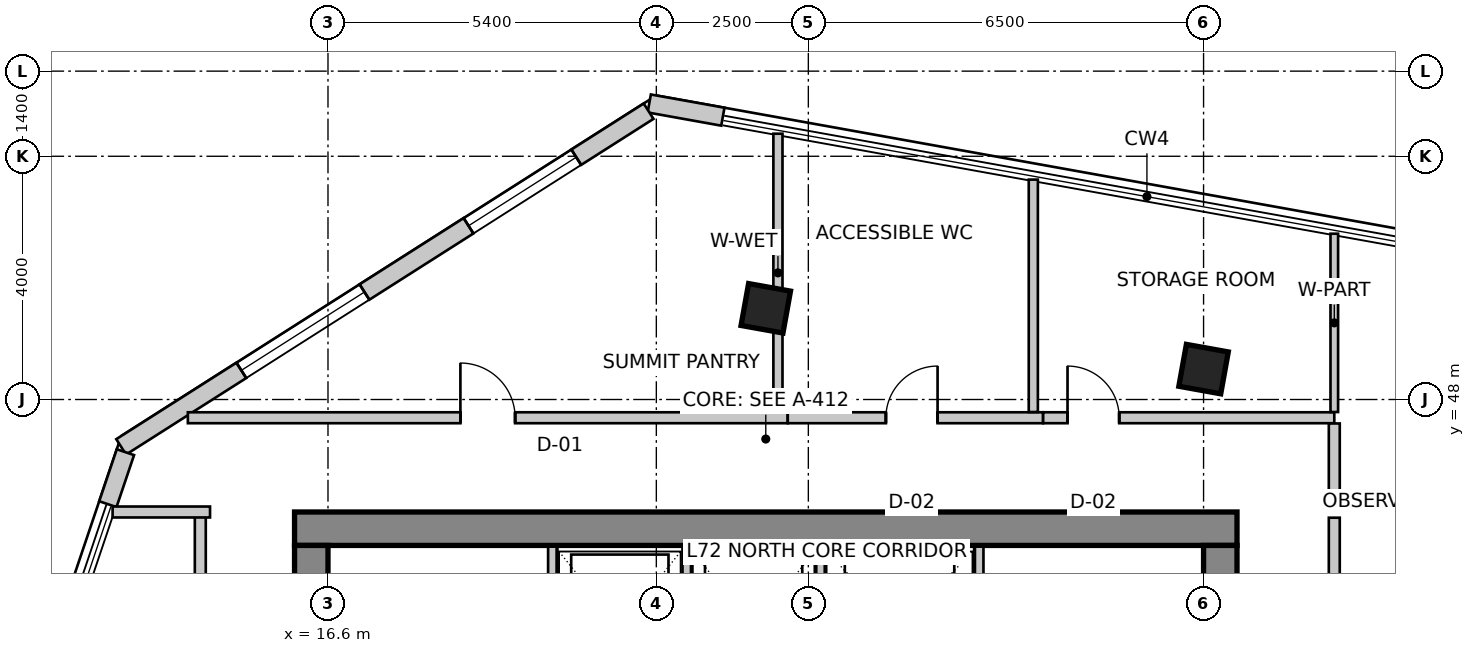
"""IFC4 building model, lengths in metres.
Left out: names, types, materials, properties, quantities, classifications, styles, units other than length and angle.
Written with IfcOpenShell. Run it as: python <this file> out.ifc"""

import sys

from ifc_helpers import new_model, si_unit, direction, frame, frame_2d, origin, origin_2d, place, context, subcontext, project, spatial, rectangle, extrude, source, transform, mapped, element, fill, save


model = new_model("IFC4")
c1 = context("Model", 3, precision=1e-05, world=origin(), true_north=direction((0.0, 1.0)))
c2 = subcontext(c1, "Body", "Model", "MODEL_VIEW")
j1 = project(units=[si_unit("LENGTHUNIT", "METRE"), si_unit("PLANEANGLEUNIT", "RADIAN")], contexts=[c1])
p1 = place(None, origin())
s1 = spatial("IfcSite", under=j1, at=p1, CompositionType="ELEMENT")
p2 = place(p1, origin())
s2 = spatial("IfcBuilding", under=s1, at=p2, CompositionType="ELEMENT")
p3 = place(p2, frame((0.0, 0.0, 281.7)))
s3 = spatial("IfcBuildingStorey", under=s2, at=p3, CompositionType="ELEMENT", Elevation=281.7)
p4 = place(p3, frame((16.05, 45.875, 0.0), z_axis=(0.0, 0.0, 1.0), x_axis=(1.0, 0.0, 0.0)))
e1 = element("IfcWall", 1, at=p4, inside=s3, PredefinedType="SHEAR", context=c2, shape_type="SweptSolid", body=[
    extrude(rectangle(XDim=15.5, YDim=0.55, at=frame_2d((7.75, 0.0))), origin(), (0.0, 0.0, 1.0), 3.6),
])
p5 = place(p3, frame((16.325, 34.2, 0.0), z_axis=(0.0, 0.0, 1.0), x_axis=(0.0, 1.0, 0.0)))
e2 = element("IfcWall", 2, at=p5, inside=s3, PredefinedType="SHEAR", context=c2, shape_type="SweptSolid", body=[
    extrude(rectangle(XDim=11.4, YDim=0.55, at=frame_2d((5.7, 0.0))), origin(), (0.0, 0.0, 1.0), 3.6),
])
m1 = source(origin(), c2, "Body", "SweptSolid", [
    extrude(rectangle(XDim=1.1, YDim=2.15, at=frame_2d((0.55, 1.075))), frame((0.0, 0.285, 0.0), z_axis=(0.0, -1.0, 0.0), x_axis=(1.0, 0.0, 0.0)), (0.0, 0.0, 1.0), 0.57),
])
p6 = place(p5, frame((7.15, 0.0, 0.0)))
e3 = element("IfcOpeningElement", 3, at=p6, cuts=e2, PredefinedType="OPENING", context=c2, shape_type="MappedRepresentation", body=[
    mapped(m1, transform((0.0, 0.0, 0.0), scale=1.0)),
])
p7 = place(p3, frame((31.275, 34.2, 0.0), z_axis=(0.0, 0.0, 1.0), x_axis=(0.0, 1.0, 0.0)))
e4 = element("IfcWall", 4, at=p7, inside=s3, PredefinedType="SHEAR", context=c2, shape_type="SweptSolid", body=[
    extrude(rectangle(XDim=11.4, YDim=0.55, at=frame_2d((5.7, 0.0))), origin(), (0.0, 0.0, 1.0), 3.6),
])
p8 = place(p7, frame((7.35, 0.0, 0.0)))
e5 = element("IfcOpeningElement", 5, at=p8, cuts=e4, PredefinedType="OPENING", context=c2, shape_type="MappedRepresentation", body=[
    mapped(m1, transform((0.0, 0.0, 0.0), scale=1.0)),
])
m2 = source(origin(), c2, "Body", "SweptSolid", [
    extrude(rectangle(XDim=0.7, YDim=0.7, at=origin_2d()), origin(), (0.0, 0.0, 1.0), 3.6),
])
for number, where, z_axis, x_axis in (
    (6, (23.8, 49.5, 0.0), (0.0, 0.0, 1.0), (0.984, -0.177, 0.0)),
    (7, (31.0, 48.5, 0.0), (0.0, 0.0, 1.0), (0.984, -0.177, 0.0)),
):
    element("IfcColumn", number, at=place(p3, frame(where, z_axis=z_axis, x_axis=x_axis)), inside=s3, PredefinedType="COLUMN", context=c2, shape_type="MappedRepresentation", body=[
        mapped(m2, transform((0.0, 0.0, 0.0), scale=1.0)),
    ])
p9 = place(p3, frame((23.094, 52.651, 0.0), z_axis=(0.0, 0.0, 1.0), x_axis=(-0.984233125072, 0.176876102146, 0.0)))
e8 = element("IfcWall", 8, at=p9, inside=s3, PredefinedType="SOLIDWALL", context=c2, shape_type="SweptSolid", body=[
    extrude(rectangle(XDim=1.23, YDim=0.3, at=frame_2d((0.615, 0.0))), origin(), (0.0, 0.0, 1.0), 3.35),
])
p10 = place(p3, frame((21.873, 52.741, 0.0), z_axis=(0.0, 0.0, 1.0), x_axis=(-0.843661487732, -0.536875492193, 0.0)))
e9 = element("IfcWall", 9, at=p10, inside=s3, PredefinedType="SOLIDWALL", context=c2, shape_type="SweptSolid", body=[
    extrude(rectangle(XDim=10.282, YDim=0.3, at=frame_2d((5.141, 0.0))), origin(), (0.0, 0.0, 1.0), 3.35),
])
m3 = source(origin(), c2, "Body", "SweptSolid", [
    extrude(rectangle(XDim=2.1, YDim=2.0, at=frame_2d((1.05, 1.0))), frame((0.0, 0.16, 0.0), z_axis=(0.0, -1.0, 0.0), x_axis=(1.0, 0.0, 0.0)), (0.0, 0.0, 1.0), 0.32),
])
p11 = place(p10, frame((1.41, 0.0, 0.85)))
e10 = element("IfcOpeningElement", 10, at=p11, cuts=e9, PredefinedType="OPENING", context=c2, shape_type="MappedRepresentation", body=[
    mapped(m3, transform((0.0, 0.0, 0.0), scale=1.0)),
])
m4 = source(origin(), c2, "Body", "SweptSolid", [
    extrude(rectangle(XDim=2.4, YDim=2.2, at=frame_2d((1.2, 1.1))), frame((0.0, 0.16, 0.0), z_axis=(0.0, -1.0, 0.0), x_axis=(1.0, 0.0, 0.0)), (0.0, 0.0, 1.0), 0.32),
])
p12 = place(p10, frame((5.539, 0.0, 0.85)))
e11 = element("IfcOpeningElement", 11, at=p12, cuts=e9, PredefinedType="OPENING", context=c2, shape_type="MappedRepresentation", body=[
    mapped(m4, transform((0.0, 0.0, 0.0), scale=1.0)),
])
p13 = place(p3, frame((13.269, 47.134, 0.0), z_axis=(0.0, 0.0, 1.0), x_axis=(-0.31995770778, -0.947431826166, 0.0)))
e12 = element("IfcWall", 12, at=p13, inside=s3, PredefinedType="SOLIDWALL", context=c2, shape_type="SweptSolid", body=[
    extrude(rectangle(XDim=0.903, YDim=0.3, at=frame_2d((0.451, 0.0))), origin(), (0.0, 0.0, 1.0), 3.35),
])
for number, where, z_axis, x_axis in (
    (13, (20.29, 43.28, 0.0), (0.0, 0.0, 1.0), (0.0, 1.0, 0.0)),
    (14, (27.31, 43.28, 0.0), (0.0, 0.0, 1.0), (0.0, 1.0, 0.0)),
):
    element("IfcWall", number, at=place(p3, frame(where, z_axis=z_axis, x_axis=x_axis)), inside=s3, PredefinedType="SOLIDWALL", context=c2, shape_type="SweptSolid", body=[
        extrude(rectangle(XDim=2.3, YDim=0.14, at=frame_2d((1.15, 0.0))), origin(), (0.0, 0.0, 1.0), 3.35),
    ])
for number, where, z_axis, x_axis in (
    (15, (22.5, 43.02, 0.0), (0.0, 0.0, 1.0), (0.0, 1.0, 0.0)),
    (16, (24.7, 43.02, 0.0), (0.0, 0.0, 1.0), (0.0, 1.0, 0.0)),
):
    element("IfcWall", number, at=place(p3, frame(where, z_axis=z_axis, x_axis=x_axis)), inside=s3, PredefinedType="SOLIDWALL", context=c2, shape_type="SweptSolid", body=[
        extrude(rectangle(XDim=2.56, YDim=0.14, at=frame_2d((1.28, 0.0))), origin(), (0.0, 0.0, 1.0), 3.35),
    ])
p14 = place(p3, frame((14.5, 33.744, 0.0), z_axis=(0.0, 0.0, 1.0), x_axis=(0.0, 1.0, 0.0)))
e17 = element("IfcWall", 17, at=p14, inside=s3, PredefinedType="PARTITIONING", context=c2, shape_type="SweptSolid", body=[
    extrude(rectangle(XDim=12.406, YDim=0.18, at=frame_2d((6.203, 0.0))), origin(), (0.0, 0.0, 1.0), 3.35),
])
m5 = source(origin(), c2, "Body", "SweptSolid", [
    extrude(rectangle(XDim=0.9, YDim=2.15, at=frame_2d((0.45, 1.075))), frame((0.0, 0.1, 0.0), z_axis=(0.0, -1.0, 0.0), x_axis=(1.0, 0.0, 0.0)), (0.0, 0.0, 1.0), 0.2),
])
p15 = place(p14, frame((4.37, 0.0, 0.0)))
e18 = element("IfcOpeningElement", 18, at=p15, cuts=e17, PredefinedType="OPENING", context=c2, shape_type="MappedRepresentation", body=[
    mapped(m5, transform((0.0, 0.0, 0.0), scale=1.0)),
])
p16 = place(p3, frame((14.66, 46.15, 0.0), z_axis=(0.0, 0.0, 1.0), x_axis=(-1.0, 0.0, 0.0)))
e19 = element("IfcWall", 19, at=p16, inside=s3, PredefinedType="PARTITIONING", context=c2, shape_type="SweptSolid", body=[
    extrude(rectangle(XDim=1.602, YDim=0.18, at=frame_2d((0.801, 0.0))), origin(), (0.0, 0.0, 1.0), 3.35),
])
p17 = place(p3, frame((14.295, 47.7, 0.0), z_axis=(0.0, 0.0, 1.0), x_axis=(1.0, 0.0, 0.0)))
e20 = element("IfcWall", 20, at=p17, inside=s3, PredefinedType="PARTITIONING", context=c2, shape_type="SweptSolid", body=[
    extrude(rectangle(XDim=9.865, YDim=0.18, at=frame_2d((4.932, 0.0))), origin(), (0.0, 0.0, 1.0), 2.935),
])
p18 = place(p17, frame((4.482, 0.0, 0.0)))
e21 = element("IfcOpeningElement", 21, at=p18, cuts=e20, PredefinedType="OPENING", context=c2, shape_type="MappedRepresentation", body=[
    mapped(m5, transform((0.0, 0.0, 0.0), scale=1.0)),
])
p19 = place(p3, frame((24.162, 47.7, 0.0), z_axis=(0.0, 0.0, 1.0), x_axis=(1.0, 0.0, 0.0)))
e22 = element("IfcWall", 22, at=p19, inside=s3, PredefinedType="PARTITIONING", context=c2, shape_type="SweptSolid", body=[
    extrude(rectangle(XDim=4.198, YDim=0.18, at=frame_2d((2.099, 0.0))), origin(), (0.0, 0.0, 1.0), 3.35),
])
m6 = source(origin(), c2, "Body", "SweptSolid", [
    extrude(rectangle(XDim=0.85, YDim=2.15, at=frame_2d((0.425, 1.075))), frame((0.0, 0.1, 0.0), z_axis=(0.0, -1.0, 0.0), x_axis=(1.0, 0.0, 0.0)), (0.0, 0.0, 1.0), 0.2),
])
p20 = place(p19, frame((1.613, 0.0, 0.0)))
e23 = element("IfcOpeningElement", 23, at=p20, cuts=e22, PredefinedType="OPENING", context=c2, shape_type="MappedRepresentation", body=[
    mapped(m6, transform((0.0, 0.0, 0.0), scale=1.0)),
])
p21 = place(p3, frame((28.362, 47.7, 0.0), z_axis=(0.0, 0.0, 1.0), x_axis=(1.0, 0.0, 0.0)))
e24 = element("IfcWall", 24, at=p21, inside=s3, PredefinedType="PARTITIONING", context=c2, shape_type="SweptSolid", body=[
    extrude(rectangle(XDim=4.788, YDim=0.18, at=frame_2d((2.394, 0.0))), origin(), (0.0, 0.0, 1.0), 2.788),
])
p22 = place(p21, frame((0.401, 0.0, 0.0)))
e25 = element("IfcOpeningElement", 25, at=p22, cuts=e24, PredefinedType="OPENING", context=c2, shape_type="MappedRepresentation", body=[
    mapped(m6, transform((0.0, 0.0, 0.0), scale=1.0)),
])
p23 = place(p3, frame((33.15, 47.606, 0.0), z_axis=(0.0, 0.0, 1.0), x_axis=(0.0, -1.0, 0.0)))
e26 = element("IfcWall", 26, at=p23, inside=s3, PredefinedType="PARTITIONING", context=c2, shape_type="SweptSolid", body=[
    extrude(rectangle(XDim=1.456, YDim=0.18, at=frame_2d((0.728, 0.0))), origin(), (0.0, 0.0, 1.0), 3.35),
])
p24 = place(p3, frame((33.15, 46.056, 0.0), z_axis=(0.0, 0.0, 1.0), x_axis=(0.0, -1.0, 0.0)))
e27 = element("IfcWall", 27, at=p24, inside=s3, PredefinedType="PARTITIONING", context=c2, shape_type="SweptSolid", body=[
    extrude(rectangle(XDim=5.716, YDim=0.18, at=frame_2d((2.858, 0.0))), origin(), (0.0, 0.0, 1.0), 2.788),
])
m7 = source(origin(), c2, "Body", "SweptSolid", [
    extrude(rectangle(XDim=1.4, YDim=2.15, at=frame_2d((0.7, 1.075))), frame((0.0, 0.1, 0.0), z_axis=(0.0, -1.0, 0.0), x_axis=(1.0, 0.0, 0.0)), (0.0, 0.0, 1.0), 0.2),
])
p25 = place(p24, frame((2.219, 0.0, 0.0)))
e28 = element("IfcOpeningElement", 28, at=p25, cuts=e27, PredefinedType="OPENING", context=c2, shape_type="MappedRepresentation", body=[
    mapped(m7, transform((0.0, 0.0, 0.0), scale=1.0)),
])
p26 = place(p3, frame((24.0, 52.371, 0.0), z_axis=(0.0, 0.0, 1.0), x_axis=(0.0, -1.0, 0.0)))
e29 = element("IfcWall", 29, at=p26, inside=s3, PredefinedType="PARTITIONING", context=c2, shape_type="SweptSolid", body=[
    extrude(rectangle(XDim=4.577, YDim=0.15, at=frame_2d((2.289, 0.0))), origin(), (0.0, 0.0, 1.0), 2.642),
])
p27 = place(p3, frame((28.2, 51.616, 0.0), z_axis=(0.0, 0.0, 1.0), x_axis=(0.0, -1.0, 0.0)))
e30 = element("IfcWall", 30, at=p27, inside=s3, PredefinedType="PARTITIONING", context=c2, shape_type="SweptSolid", body=[
    extrude(rectangle(XDim=3.822, YDim=0.15, at=frame_2d((1.911, 0.0))), origin(), (0.0, 0.0, 1.0), 2.642),
])
p28 = place(p3, frame((33.15, 50.727, 0.0), z_axis=(0.0, 0.0, 1.0), x_axis=(0.0, -1.0, 0.0)))
e31 = element("IfcWall", 31, at=p28, inside=s3, PredefinedType="PARTITIONING", context=c2, shape_type="SweptSolid", body=[
    extrude(rectangle(XDim=2.933, YDim=0.125, at=frame_2d((1.466, 0.0))), origin(), (0.0, 0.0, 1.0), 2.642),
])
m8 = source(origin(), c2, "Body", "SweptSolid", [
    extrude(rectangle(XDim=2.1, YDim=2.0, at=frame_2d((1.05, 1.0))), frame((0.0, -0.015, 0.0), z_axis=(0.0, -1.0, 0.0), x_axis=(1.0, 0.0, 0.0)), (0.0, 0.0, 1.0), 0.06),
])
p29 = place(p11, origin())
e32 = element("IfcWindow", 32, at=p29, inside=s3, PartitioningType="SINGLE_PANEL", PredefinedType="WINDOW", context=c2, shape_type="MappedRepresentation", body=[
    mapped(m8, transform((0.0, 0.0, 0.0), scale=1.0)),
])
fill(e10, e32)
m9 = source(origin(), c2, "Body", "SweptSolid", [
    extrude(rectangle(XDim=2.4, YDim=2.2, at=frame_2d((1.2, 1.1))), frame((0.0, -0.015, 0.0), z_axis=(0.0, -1.0, 0.0), x_axis=(1.0, 0.0, 0.0)), (0.0, 0.0, 1.0), 0.06),
])
p30 = place(p12, origin())
e33 = element("IfcWindow", 33, at=p30, inside=s3, PartitioningType="SINGLE_PANEL", PredefinedType="WINDOW", context=c2, shape_type="MappedRepresentation", body=[
    mapped(m9, transform((0.0, 0.0, 0.0), scale=1.0)),
])
fill(e11, e33)
m10 = source(origin(), c2, "Body", "SweptSolid", [
    extrude(rectangle(XDim=0.9, YDim=2.15, at=frame_2d((0.45, 1.075))), frame((0.0, 0.025, 0.0), z_axis=(0.0, -1.0, 0.0), x_axis=(1.0, 0.0, 0.0)), (0.0, 0.0, 1.0), 0.05),
])
p31 = place(p18, origin())
e34 = element("IfcDoor", 34, at=p31, inside=s3, OperationType="SINGLE_SWING_LEFT", PredefinedType="DOOR", context=c2, shape_type="MappedRepresentation", body=[
    mapped(m10, transform((0.0, 0.0, 0.0), scale=1.0)),
])
fill(e21, e34)
m11 = source(origin(), c2, "Body", "SweptSolid", [
    extrude(rectangle(XDim=0.85, YDim=2.15, at=frame_2d((0.425, 1.075))), frame((0.0, 0.025, 0.0), z_axis=(0.0, -1.0, 0.0), x_axis=(1.0, 0.0, 0.0)), (0.0, 0.0, 1.0), 0.05),
])
p32 = place(p20, origin())
e35 = element("IfcDoor", 35, at=p32, inside=s3, OperationType="SINGLE_SWING_RIGHT", PredefinedType="DOOR", context=c2, shape_type="MappedRepresentation", body=[
    mapped(m11, transform((0.0, 0.0, 0.0), scale=1.0)),
])
fill(e23, e35)
p33 = place(p22, origin())
e36 = element("IfcDoor", 36, at=p33, inside=s3, OperationType="SINGLE_SWING_LEFT", PredefinedType="DOOR", context=c2, shape_type="MappedRepresentation", body=[
    mapped(m11, transform((0.0, 0.0, 0.0), scale=1.0)),
])
fill(e25, e36)
save(model, sys.argv[1])
